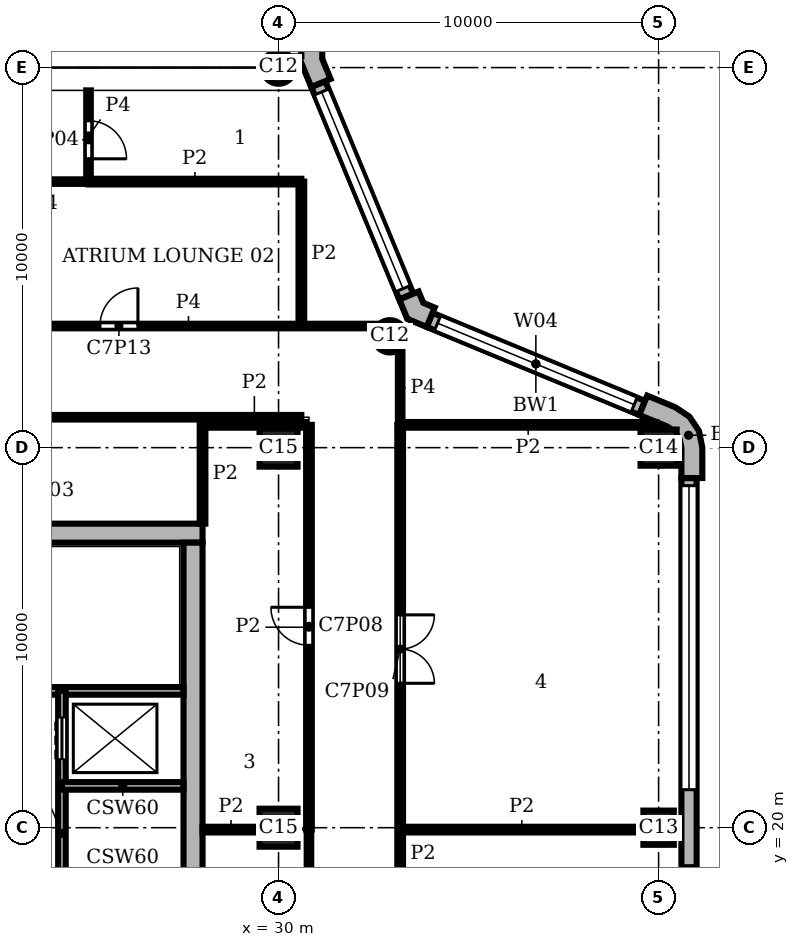
"""IFC4 building model, lengths in metres.
Left out: names, types, materials, properties, quantities, classifications, styles, units other than length and angle.
Written with IfcOpenShell. Run it as: python <this file> out.ifc"""

import sys

from ifc_helpers import new_model, si_unit, direction, frame, frame_2d, origin, origin_2d, place, context, subcontext, project, spatial, polyline, rectangle, circle, outline, extrude, element, fill, save


model = new_model("IFC4")
c1 = context("Model", 3, precision=1e-05, world=origin(), true_north=direction((0.0, 1.0)))
c2 = subcontext(c1, "Body", "Model", "MODEL_VIEW")
j1 = project(units=[si_unit("LENGTHUNIT", "METRE"), si_unit("PLANEANGLEUNIT", "RADIAN")], contexts=[c1])
p1 = place(None, origin())
s1 = spatial("IfcSite", under=j1, at=p1, CompositionType="ELEMENT")
p2 = place(p1, origin())
s2 = spatial("IfcBuilding", under=s1, at=p2, CompositionType="ELEMENT")
p3 = place(p2, frame((0.0, 0.0, 313.8)))
s3 = spatial("IfcBuildingStorey", under=s2, at=p3, CompositionType="ELEMENT", Elevation=313.8)
p4 = place(p3, frame((40.0, 20.0, 0.0), z_axis=(0.0, 0.0, 1.0), x_axis=(0.0, 1.0, 0.0)))
e1 = element("IfcColumn", 1, at=p4, inside=s3, PredefinedType="COLUMN", context=c2, shape_type="SweptSolid", body=[
    extrude(rectangle(XDim=0.9, YDim=0.8, at=origin_2d()), origin(), (0.0, 0.0, 1.0), 3.9),
])
p5 = place(p3, frame((40.0, 30.0, 0.0), z_axis=(0.0, 0.0, 1.0), x_axis=(1.0, 0.0, 0.0)))
e2 = element("IfcColumn", 2, at=p5, inside=s3, PredefinedType="COLUMN", context=c2, shape_type="SweptSolid", body=[
    extrude(rectangle(XDim=0.95, YDim=0.95, at=origin_2d()), origin(), (0.0, 0.0, 1.0), 3.9),
])
for number, where, z_axis, x_axis in (
    (3, (32.929, 32.929, 0.0), (0.0, 0.0, 1.0), (1.0, 0.0, 0.0)),
    (4, (30.0, 40.0, 0.0), (0.0, 0.0, 1.0), (1.0, 0.0, 0.0)),
):
    element("IfcColumn", number, at=place(p3, frame(where, z_axis=z_axis, x_axis=x_axis)), inside=s3, PredefinedType="COLUMN", context=c2, shape_type="SweptSolid", body=[
        extrude(circle(Radius=0.425, at=origin_2d()), origin(), (0.0, 0.0, 1.0), 3.9),
    ])
for number, where, z_axis, x_axis in (
    (5, (30.0, 20.0, 0.0), (0.0, 0.0, 1.0), (1.0, 0.0, 0.0)),
    (6, (30.0, 30.0, 0.0), (0.0, 0.0, 1.0), (1.0, 0.0, 0.0)),
):
    element("IfcColumn", number, at=place(p3, frame(where, z_axis=z_axis, x_axis=x_axis)), inside=s3, PredefinedType="COLUMN", context=c2, shape_type="SweptSolid", body=[
        extrude(rectangle(XDim=1.0, YDim=1.0, at=origin_2d()), origin(), (0.0, 0.0, 1.0), 3.9),
    ])
p6 = place(p3, frame((27.75, 8.5, 0.0), z_axis=(0.0, 0.0, 1.0), x_axis=(0.0, 1.0, 0.0)))
e7 = element("IfcWall", 7, at=p6, inside=s3, PredefinedType="SHEAR", context=c2, shape_type="SweptSolid", body=[
    extrude(rectangle(XDim=19.0, YDim=0.5, at=frame_2d((9.5, 0.0))), origin(), (0.0, 0.0, 1.0), 3.9),
])
p7 = place(p6, frame((4.95, 0.0, 0.0)))
e8 = element("IfcOpeningElement", 8, at=p7, cuts=e7, PredefinedType="OPENING", context=c2, shape_type="SweptSolid", body=[
    extrude(rectangle(XDim=1.6, YDim=2.1, at=frame_2d((0.8, 1.05))), frame((0.0, 0.26, 0.0), z_axis=(0.0, -1.0, 0.0), x_axis=(1.0, 0.0, 0.0)), (0.0, 0.0, 1.0), 0.52),
])
p8 = place(p3, frame((28.0, 27.75, 0.0), z_axis=(0.0, 0.0, 1.0), x_axis=(-1.0, 0.0, 0.0)))
e9 = element("IfcWall", 9, at=p8, inside=s3, PredefinedType="SHEAR", context=c2, shape_type="SweptSolid", body=[
    extrude(rectangle(XDim=20.0, YDim=0.5, at=frame_2d((10.0, 0.0))), origin(), (0.0, 0.0, 1.0), 3.9),
])
p9 = place(p3, origin())
e10 = element("IfcWall", 10, at=p9, inside=s3, PredefinedType="SOLIDWALL", context=c2, shape_type="SweptSolid", body=[
    extrude(outline(polyline([(41.0, 29.2), (41.15, 29.2), (41.15, 30.0), (41.062, 30.44), (40.813, 30.813), (40.44, 31.062), (39.701, 31.369), (39.644, 31.23), (39.49, 30.861), (40.229, 30.554), (40.424, 30.424), (40.554, 30.229), (40.6, 30.0), (40.6, 29.2), (41.0, 29.2)])), origin(), (0.0, 0.0, 1.0), 3.9),
])
e11 = element("IfcWall", 11, at=p9, inside=s3, PredefinedType="SOLIDWALL", context=c2, shape_type="SweptSolid", body=[
    extrude(outline(polyline([(34.051, 33.547), (34.108, 33.685), (33.809, 33.809), (33.685, 34.108), (33.547, 34.051), (33.177, 33.898), (33.388, 33.388), (33.898, 33.177), (34.051, 33.547)])), origin(), (0.0, 0.0, 1.0), 3.9),
])
e12 = element("IfcWall", 12, at=p9, inside=s3, PredefinedType="SOLIDWALL", context=c2, shape_type="SweptSolid", body=[
    extrude(outline(polyline([(30.62, 39.995), (30.62, 40.071), (30.861, 39.49), (31.23, 39.644), (31.369, 39.701), (31.15, 40.229), (31.15, 40.8), (31.0, 40.8), (30.6, 40.8), (30.6, 40.295), (30.425, 40.295), (30.425, 39.995), (30.62, 39.995)])), origin(), (0.0, 0.0, 1.0), 3.9),
])
p10 = place(p3, frame((40.8, 0.8, 0.0), z_axis=(0.0, 0.0, 1.0), x_axis=(0.0, 1.0, 0.0)))
e13 = element("IfcWall", 13, at=p10, inside=s3, PredefinedType="SOLIDWALL", context=c2, shape_type="SweptSolid", body=[
    extrude(rectangle(XDim=28.4, YDim=0.4, at=frame_2d((14.2, 0.0))), origin(), (0.0, 0.0, 1.0), 3.9),
])
p11 = place(p10, frame((0.2, 0.0, 0.9)))
e14 = element("IfcOpeningElement", 14, at=p11, cuts=e13, PredefinedType="OPENING", context=c2, shape_type="SweptSolid", body=[
    extrude(rectangle(XDim=8.0, YDim=2.35, at=frame_2d((4.0, 1.175))), frame((0.0, 0.21, 0.0), z_axis=(0.0, -1.0, 0.0), x_axis=(1.0, 0.0, 0.0)), (0.0, 0.0, 1.0), 0.42),
])
p12 = place(p10, frame((10.2, 0.0, 0.9)))
e15 = element("IfcOpeningElement", 15, at=p12, cuts=e13, PredefinedType="OPENING", context=c2, shape_type="SweptSolid", body=[
    extrude(rectangle(XDim=8.0, YDim=2.35, at=frame_2d((4.0, 1.175))), frame((0.0, 0.21, 0.0), z_axis=(0.0, -1.0, 0.0), x_axis=(1.0, 0.0, 0.0)), (0.0, 0.0, 1.0), 0.42),
])
p13 = place(p10, frame((20.2, 0.0, 0.9)))
e16 = element("IfcOpeningElement", 16, at=p13, cuts=e13, PredefinedType="OPENING", context=c2, shape_type="SweptSolid", body=[
    extrude(rectangle(XDim=8.0, YDim=2.35, at=frame_2d((4.0, 1.175))), frame((0.0, 0.21, 0.0), z_axis=(0.0, -1.0, 0.0), x_axis=(1.0, 0.0, 0.0)), (0.0, 0.0, 1.0), 0.42),
])
p14 = place(p3, frame((39.567, 31.045, 0.0), z_axis=(0.0, 0.0, 1.0), x_axis=(-0.923891000409, 0.382655745237, 0.0)))
e17 = element("IfcWall", 17, at=p14, inside=s3, PredefinedType="SOLIDWALL", context=c2, shape_type="SweptSolid", body=[
    extrude(rectangle(XDim=6.053, YDim=0.4, at=frame_2d((3.027, 0.0))), origin(), (0.0, 0.0, 1.0), 3.9),
])
p15 = place(p14, frame((0.227, 0.0, 0.9)))
e18 = element("IfcOpeningElement", 18, at=p15, cuts=e17, PredefinedType="OPENING", context=c2, shape_type="SweptSolid", body=[
    extrude(rectangle(XDim=5.6, YDim=2.35, at=frame_2d((2.8, 1.175))), frame((0.0, 0.21, 0.0), z_axis=(0.0, -1.0, 0.0), x_axis=(1.0, 0.0, 0.0)), (0.0, 0.0, 1.0), 0.42),
])
p16 = place(p3, frame((33.362, 33.974, 0.0), z_axis=(0.0, 0.0, 1.0), x_axis=(-0.382655745237, 0.923891000409, 0.0)))
e19 = element("IfcWall", 19, at=p16, inside=s3, PredefinedType="SOLIDWALL", context=c2, shape_type="SweptSolid", body=[
    extrude(rectangle(XDim=6.053, YDim=0.4, at=frame_2d((3.027, 0.0))), origin(), (0.0, 0.0, 1.0), 3.9),
])
p17 = place(p16, frame((0.227, 0.0, 0.9)))
e20 = element("IfcOpeningElement", 20, at=p17, cuts=e19, PredefinedType="OPENING", context=c2, shape_type="SweptSolid", body=[
    extrude(rectangle(XDim=5.6, YDim=2.35, at=frame_2d((2.8, 1.175))), frame((0.0, 0.21, 0.0), z_axis=(0.0, -1.0, 0.0), x_axis=(1.0, 0.0, 0.0)), (0.0, 0.0, 1.0), 0.42),
])
p18 = place(p3, frame((24.3, 21.1, 0.0), z_axis=(0.0, 0.0, 1.0), x_axis=(1.0, 0.0, 0.0)))
e21 = element("IfcWall", 21, at=p18, inside=s3, PredefinedType="SHEAR", context=c2, shape_type="SweptSolid", body=[
    extrude(rectangle(XDim=3.2, YDim=0.2, at=frame_2d((1.6, 0.0))), origin(), (0.0, 0.0, 1.0), 3.58),
])
p19 = place(p3, frame((13.8, 23.6, 0.0), z_axis=(0.0, 0.0, 1.0), x_axis=(1.0, 0.0, 0.0)))
e22 = element("IfcWall", 22, at=p19, inside=s3, PredefinedType="SHEAR", context=c2, shape_type="SweptSolid", body=[
    extrude(rectangle(XDim=13.7, YDim=0.2, at=frame_2d((6.85, 0.0))), origin(), (0.0, 0.0, 1.0), 3.58),
])
p20 = place(p19, frame((2.4, 0.0, 0.0)))
e23 = element("IfcOpeningElement", 23, at=p20, cuts=e22, PredefinedType="OPENING", context=c2, shape_type="SweptSolid", body=[
    extrude(rectangle(XDim=1.1, YDim=2.1, at=frame_2d((0.55, 1.05))), frame((0.0, 0.11, 0.0), z_axis=(0.0, -1.0, 0.0), x_axis=(1.0, 0.0, 0.0)), (0.0, 0.0, 1.0), 0.22),
])
p21 = place(p19, frame((4.9, 0.0, 0.0)))
e24 = element("IfcOpeningElement", 24, at=p21, cuts=e22, PredefinedType="OPENING", context=c2, shape_type="SweptSolid", body=[
    extrude(rectangle(XDim=1.1, YDim=2.1, at=frame_2d((0.55, 1.05))), frame((0.0, 0.11, 0.0), z_axis=(0.0, -1.0, 0.0), x_axis=(1.0, 0.0, 0.0)), (0.0, 0.0, 1.0), 0.22),
])
p22 = place(p19, frame((0.15, 0.0, 0.0)))
e25 = element("IfcOpeningElement", 25, at=p22, cuts=e22, PredefinedType="OPENING", context=c2, shape_type="SweptSolid", body=[
    extrude(rectangle(XDim=1.0, YDim=2.1, at=frame_2d((0.5, 1.05))), frame((0.0, 0.11, 0.0), z_axis=(0.0, -1.0, 0.0), x_axis=(1.0, 0.0, 0.0)), (0.0, 0.0, 1.0), 0.22),
])
p23 = place(p3, frame((24.3, 16.1, 0.0), z_axis=(0.0, 0.0, 1.0), x_axis=(0.0, 1.0, 0.0)))
e26 = element("IfcWall", 26, at=p23, inside=s3, PredefinedType="SHEAR", context=c2, shape_type="SweptSolid", body=[
    extrude(rectangle(XDim=7.5, YDim=0.2, at=frame_2d((3.75, 0.0))), origin(), (0.0, 0.0, 1.0), 3.58),
])
p24 = place(p23, frame((5.7, 0.0, 0.0)))
e27 = element("IfcOpeningElement", 27, at=p24, cuts=e26, PredefinedType="OPENING", context=c2, shape_type="SweptSolid", body=[
    extrude(rectangle(XDim=1.1, YDim=2.1, at=frame_2d((0.55, 1.05))), frame((0.0, 0.11, 0.0), z_axis=(0.0, -1.0, 0.0), x_axis=(1.0, 0.0, 0.0)), (0.0, 0.0, 1.0), 0.22),
])
p25 = place(p3, frame((28.0, 28.0, 0.0), z_axis=(0.0, 0.0, 1.0), x_axis=(0.0, 1.0, 0.0)))
e28 = element("IfcWall", 28, at=p25, inside=s3, PredefinedType="PARTITIONING", context=c2, shape_type="SweptSolid", body=[
    extrude(rectangle(XDim=2.598, YDim=0.15, at=frame_2d((1.299, 0.0))), origin(), (0.0, 0.0, 1.0), 3.58),
])
p26 = place(p3, frame((30.6, 33.2, 0.0), z_axis=(0.0, 0.0, 1.0), x_axis=(0.0, 1.0, 0.0)))
e29 = element("IfcWall", 29, at=p26, inside=s3, PredefinedType="PARTITIONING", context=c2, shape_type="SweptSolid", body=[
    extrude(rectangle(XDim=3.8, YDim=0.15, at=frame_2d((1.9, 0.0))), origin(), (0.0, 0.0, 1.0), 3.58),
])
p27 = place(p3, frame((30.8, 19.95, 0.0), z_axis=(0.0, 0.0, 1.0), x_axis=(0.0, 1.0, 0.0)))
e30 = element("IfcWall", 30, at=p27, inside=s3, PredefinedType="PARTITIONING", context=c2, shape_type="SweptSolid", body=[
    extrude(rectangle(XDim=10.65, YDim=0.15, at=frame_2d((5.325, 0.0))), origin(), (0.0, 0.0, 1.0), 3.58),
])
p28 = place(p27, frame((4.85, 0.0, 0.0)))
e31 = element("IfcOpeningElement", 31, at=p28, cuts=e30, PredefinedType="OPENING", context=c2, shape_type="SweptSolid", body=[
    extrude(rectangle(XDim=1.0, YDim=2.1, at=frame_2d((0.5, 1.05))), frame((0.0, 0.085, 0.0), z_axis=(0.0, -1.0, 0.0), x_axis=(1.0, 0.0, 0.0)), (0.0, 0.0, 1.0), 0.17),
])
p29 = place(p3, frame((33.2, 8.0, 0.0), z_axis=(0.0, 0.0, 1.0), x_axis=(0.0, 1.0, 0.0)))
e32 = element("IfcWall", 32, at=p29, inside=s3, PredefinedType="PARTITIONING", context=c2, shape_type="SweptSolid", body=[
    extrude(rectangle(XDim=22.6, YDim=0.15, at=frame_2d((11.3, 0.0))), origin(), (0.0, 0.0, 1.0), 3.58),
])
p30 = place(p29, frame((15.8, 0.0, 0.0)))
e33 = element("IfcOpeningElement", 33, at=p30, cuts=e32, PredefinedType="OPENING", context=c2, shape_type="SweptSolid", body=[
    extrude(rectangle(XDim=1.8, YDim=2.1, at=frame_2d((0.9, 1.05))), frame((0.0, 0.085, 0.0), z_axis=(0.0, -1.0, 0.0), x_axis=(1.0, 0.0, 0.0)), (0.0, 0.0, 1.0), 0.17),
])
p31 = place(p3, frame((28.0, 19.95, 0.0), z_axis=(0.0, 0.0, 1.0), x_axis=(1.0, 0.0, 0.0)))
e34 = element("IfcWall", 34, at=p31, inside=s3, PredefinedType="PARTITIONING", context=c2, shape_type="SweptSolid", body=[
    extrude(rectangle(XDim=1.5, YDim=0.15, at=frame_2d((0.75, 0.0))), origin(), (0.0, 0.0, 1.0), 3.58),
])
p32 = place(p3, frame((33.2, 19.95, 0.0), z_axis=(0.0, 0.0, 1.0), x_axis=(1.0, 0.0, 0.0)))
e35 = element("IfcWall", 35, at=p32, inside=s3, PredefinedType="PARTITIONING", context=c2, shape_type="SweptSolid", body=[
    extrude(rectangle(XDim=6.4, YDim=0.15, at=frame_2d((3.2, 0.0))), origin(), (0.0, 0.0, 1.0), 3.58),
])
p33 = place(p3, frame((28.002, 30.6, 0.0), z_axis=(0.0, 0.0, 1.0), x_axis=(1.0, 0.0, 0.0)))
e36 = element("IfcWall", 36, at=p33, inside=s3, PredefinedType="PARTITIONING", context=c2, shape_type="SweptSolid", body=[
    extrude(rectangle(XDim=2.723, YDim=0.15, at=frame_2d((1.362, 0.0))), origin(), (0.0, 0.0, 1.0), 3.58),
])
p34 = place(p3, frame((33.2, 30.6, 0.0), z_axis=(0.0, 0.0, 1.0), x_axis=(1.0, 0.0, 0.0)))
e37 = element("IfcWall", 37, at=p34, inside=s3, PredefinedType="PARTITIONING", context=c2, shape_type="SweptSolid", body=[
    extrude(rectangle(XDim=6.738, YDim=0.15, at=frame_2d((3.369, 0.0))), origin(), (0.0, 0.0, 1.0), 3.58),
])
p35 = place(p3, frame((25.0, 37.0, 0.0), z_axis=(0.0, 0.0, 1.0), x_axis=(1.0, 0.0, 0.0)))
e38 = element("IfcWall", 38, at=p35, inside=s3, PredefinedType="PARTITIONING", context=c2, shape_type="SweptSolid", body=[
    extrude(rectangle(XDim=5.6, YDim=0.15, at=frame_2d((2.8, 0.0))), origin(), (0.0, 0.0, 1.0), 3.58),
])
p36 = place(p3, frame((25.0, 37.0, 0.0), z_axis=(0.0, 0.0, 1.0), x_axis=(0.0, 1.0, 0.0)))
e39 = element("IfcWall", 39, at=p36, inside=s3, PredefinedType="PARTITIONING", context=c2, shape_type="SweptSolid", body=[
    extrude(rectangle(XDim=2.4, YDim=0.12, at=frame_2d((1.2, 0.0))), origin(), (0.0, 0.0, 1.0), 3.58),
])
p37 = place(p36, frame((0.6, 0.0, 0.0)))
e40 = element("IfcOpeningElement", 40, at=p37, cuts=e39, PredefinedType="OPENING", context=c2, shape_type="SweptSolid", body=[
    extrude(rectangle(XDim=1.0, YDim=2.1, at=frame_2d((0.5, 1.05))), frame((0.0, 0.07, 0.0), z_axis=(0.0, -1.0, 0.0), x_axis=(1.0, 0.0, 0.0)), (0.0, 0.0, 1.0), 0.14),
])
p38 = place(p3, frame((30.8, 15.45, 0.0), z_axis=(0.0, 0.0, 1.0), x_axis=(0.0, 1.0, 0.0)))
e41 = element("IfcWall", 41, at=p38, inside=s3, PredefinedType="PARTITIONING", context=c2, shape_type="SweptSolid", body=[
    extrude(rectangle(XDim=4.5, YDim=0.12, at=frame_2d((2.25, 0.0))), origin(), (0.0, 0.0, 1.0), 3.58),
])
p39 = place(p38, frame((1.35, 0.0, 0.0)))
e42 = element("IfcOpeningElement", 42, at=p39, cuts=e41, PredefinedType="OPENING", context=c2, shape_type="SweptSolid", body=[
    extrude(rectangle(XDim=1.0, YDim=2.1, at=frame_2d((0.5, 1.05))), frame((0.0, 0.07, 0.0), z_axis=(0.0, -1.0, 0.0), x_axis=(1.0, 0.0, 0.0)), (0.0, 0.0, 1.0), 0.14),
])
p40 = place(p3, frame((33.2, 30.6, 0.0), z_axis=(0.0, 0.0, 1.0), x_axis=(0.0, 1.0, 0.0)))
e43 = element("IfcWall", 43, at=p40, inside=s3, PredefinedType="PARTITIONING", context=c2, shape_type="SweptSolid", body=[
    extrude(rectangle(XDim=1.96, YDim=0.12, at=frame_2d((0.98, 0.0))), origin(), (0.0, 0.0, 1.0), 3.58),
])
p41 = place(p3, frame((13.802, 30.8, 0.0), z_axis=(0.0, 0.0, 1.0), x_axis=(1.0, 0.0, 0.0)))
e44 = element("IfcWall", 44, at=p41, inside=s3, PredefinedType="PARTITIONING", context=c2, shape_type="SweptSolid", body=[
    extrude(rectangle(XDim=16.797, YDim=0.12, at=frame_2d((8.398, 0.0))), origin(), (0.0, 0.0, 1.0), 3.58),
])
p42 = place(p41, frame((8.1, 0.0, 0.0)))
e45 = element("IfcOpeningElement", 45, at=p42, cuts=e44, PredefinedType="OPENING", context=c2, shape_type="SweptSolid", body=[
    extrude(rectangle(XDim=1.0, YDim=2.1, at=frame_2d((0.5, 1.05))), frame((0.0, 0.07, 0.0), z_axis=(0.0, -1.0, 0.0), x_axis=(1.0, 0.0, 0.0)), (0.0, 0.0, 1.0), 0.14),
])
p43 = place(p3, frame((22.7, 33.2, 0.0), z_axis=(0.0, 0.0, 1.0), x_axis=(1.0, 0.0, 0.0)))
e46 = element("IfcWall", 46, at=p43, inside=s3, PredefinedType="PARTITIONING", context=c2, shape_type="SweptSolid", body=[
    extrude(rectangle(XDim=9.86, YDim=0.12, at=frame_2d((4.93, 0.0))), origin(), (0.0, 0.0, 1.0), 3.58),
])
p44 = place(p43, frame((2.6, 0.0, 0.0)))
e47 = element("IfcOpeningElement", 47, at=p44, cuts=e46, PredefinedType="OPENING", context=c2, shape_type="SweptSolid", body=[
    extrude(rectangle(XDim=1.0, YDim=2.1, at=frame_2d((0.5, 1.05))), frame((0.0, 0.07, 0.0), z_axis=(0.0, -1.0, 0.0), x_axis=(1.0, 0.0, 0.0)), (0.0, 0.0, 1.0), 0.14),
])
p45 = place(p3, frame((22.7, 37.0, 0.0), z_axis=(0.0, 0.0, 1.0), x_axis=(1.0, 0.0, 0.0)))
e48 = element("IfcWall", 48, at=p45, inside=s3, PredefinedType="PARTITIONING", context=c2, shape_type="SweptSolid", body=[
    extrude(rectangle(XDim=2.3, YDim=0.12, at=frame_2d((1.15, 0.0))), origin(), (0.0, 0.0, 1.0), 3.58),
])
p46 = place(p12, origin())
e49 = element("IfcWindow", 49, at=p46, inside=s3, PartitioningType="SINGLE_PANEL", PredefinedType="WINDOW", context=c2, shape_type="SweptSolid", body=[
    extrude(rectangle(XDim=8.0, YDim=2.35, at=frame_2d((4.0, 1.175))), frame((0.0, 0.16, 0.0), z_axis=(0.0, -1.0, 0.0), x_axis=(1.0, 0.0, 0.0)), (0.0, 0.0, 1.0), 0.06),
])
fill(e15, e49)
p47 = place(p13, origin())
e50 = element("IfcWindow", 50, at=p47, inside=s3, PartitioningType="SINGLE_PANEL", PredefinedType="WINDOW", context=c2, shape_type="SweptSolid", body=[
    extrude(rectangle(XDim=8.0, YDim=2.35, at=frame_2d((4.0, 1.175))), frame((0.0, 0.16, 0.0), z_axis=(0.0, -1.0, 0.0), x_axis=(1.0, 0.0, 0.0)), (0.0, 0.0, 1.0), 0.06),
])
fill(e16, e50)
p48 = place(p15, origin())
e51 = element("IfcWindow", 51, at=p48, inside=s3, PartitioningType="SINGLE_PANEL", PredefinedType="WINDOW", context=c2, shape_type="SweptSolid", body=[
    extrude(rectangle(XDim=5.6, YDim=2.35, at=frame_2d((2.8, 1.175))), frame((0.0, 0.16, 0.0), z_axis=(0.0, -1.0, 0.0), x_axis=(1.0, 0.0, 0.0)), (0.0, 0.0, 1.0), 0.06),
])
fill(e18, e51)
p49 = place(p17, origin())
e52 = element("IfcWindow", 52, at=p49, inside=s3, PartitioningType="SINGLE_PANEL", PredefinedType="WINDOW", context=c2, shape_type="SweptSolid", body=[
    extrude(rectangle(XDim=5.6, YDim=2.35, at=frame_2d((2.8, 1.175))), frame((0.0, 0.16, 0.0), z_axis=(0.0, -1.0, 0.0), x_axis=(1.0, 0.0, 0.0)), (0.0, 0.0, 1.0), 0.06),
])
fill(e20, e52)
p50 = place(p24, origin())
e53 = element("IfcDoor", 53, at=p50, inside=s3, OperationType="DOUBLE_DOOR_SLIDING", PredefinedType="DOOR", context=c2, shape_type="SweptSolid", body=[
    extrude(rectangle(XDim=1.1, YDim=2.1, at=frame_2d((0.55, 1.05))), frame((0.0, 0.025, 0.0), z_axis=(0.0, -1.0, 0.0), x_axis=(1.0, 0.0, 0.0)), (0.0, 0.0, 1.0), 0.05),
])
fill(e27, e53)
p51 = place(p37, frame((1.0, 0.0, 0.0), z_axis=(0.0, 0.0, 1.0), x_axis=(-1.0, 0.0, 0.0)))
e54 = element("IfcDoor", 54, at=p51, inside=s3, OperationType="SINGLE_SWING_RIGHT", PredefinedType="DOOR", context=c2, shape_type="SweptSolid", body=[
    extrude(rectangle(XDim=1.0, YDim=2.1, at=frame_2d((0.5, 1.05))), frame((0.0, 0.025, 0.0), z_axis=(0.0, -1.0, 0.0), x_axis=(1.0, 0.0, 0.0)), (0.0, 0.0, 1.0), 0.05),
])
fill(e40, e54)
p52 = place(p28, origin())
e55 = element("IfcDoor", 55, at=p52, inside=s3, OperationType="SINGLE_SWING_RIGHT", PredefinedType="DOOR", context=c2, shape_type="SweptSolid", body=[
    extrude(rectangle(XDim=1.0, YDim=2.1, at=frame_2d((0.5, 1.05))), frame((0.0, 0.025, 0.0), z_axis=(0.0, -1.0, 0.0), x_axis=(1.0, 0.0, 0.0)), (0.0, 0.0, 1.0), 0.05),
])
fill(e31, e55)
p53 = place(p30, frame((1.8, 0.0, 0.0), z_axis=(0.0, 0.0, 1.0), x_axis=(-1.0, 0.0, 0.0)))
e56 = element("IfcDoor", 56, at=p53, inside=s3, OperationType="DOUBLE_DOOR_SINGLE_SWING", PredefinedType="DOOR", context=c2, shape_type="SweptSolid", body=[
    extrude(rectangle(XDim=1.8, YDim=2.1, at=frame_2d((0.9, 1.05))), frame((0.0, 0.025, 0.0), z_axis=(0.0, -1.0, 0.0), x_axis=(1.0, 0.0, 0.0)), (0.0, 0.0, 1.0), 0.05),
])
fill(e33, e56)
p54 = place(p44, origin())
e57 = element("IfcDoor", 57, at=p54, inside=s3, OperationType="SINGLE_SWING_RIGHT", PredefinedType="DOOR", context=c2, shape_type="SweptSolid", body=[
    extrude(rectangle(XDim=1.0, YDim=2.1, at=frame_2d((0.5, 1.05))), frame((0.0, 0.025, 0.0), z_axis=(0.0, -1.0, 0.0), x_axis=(1.0, 0.0, 0.0)), (0.0, 0.0, 1.0), 0.05),
])
fill(e47, e57)
save(model, sys.argv[1])
